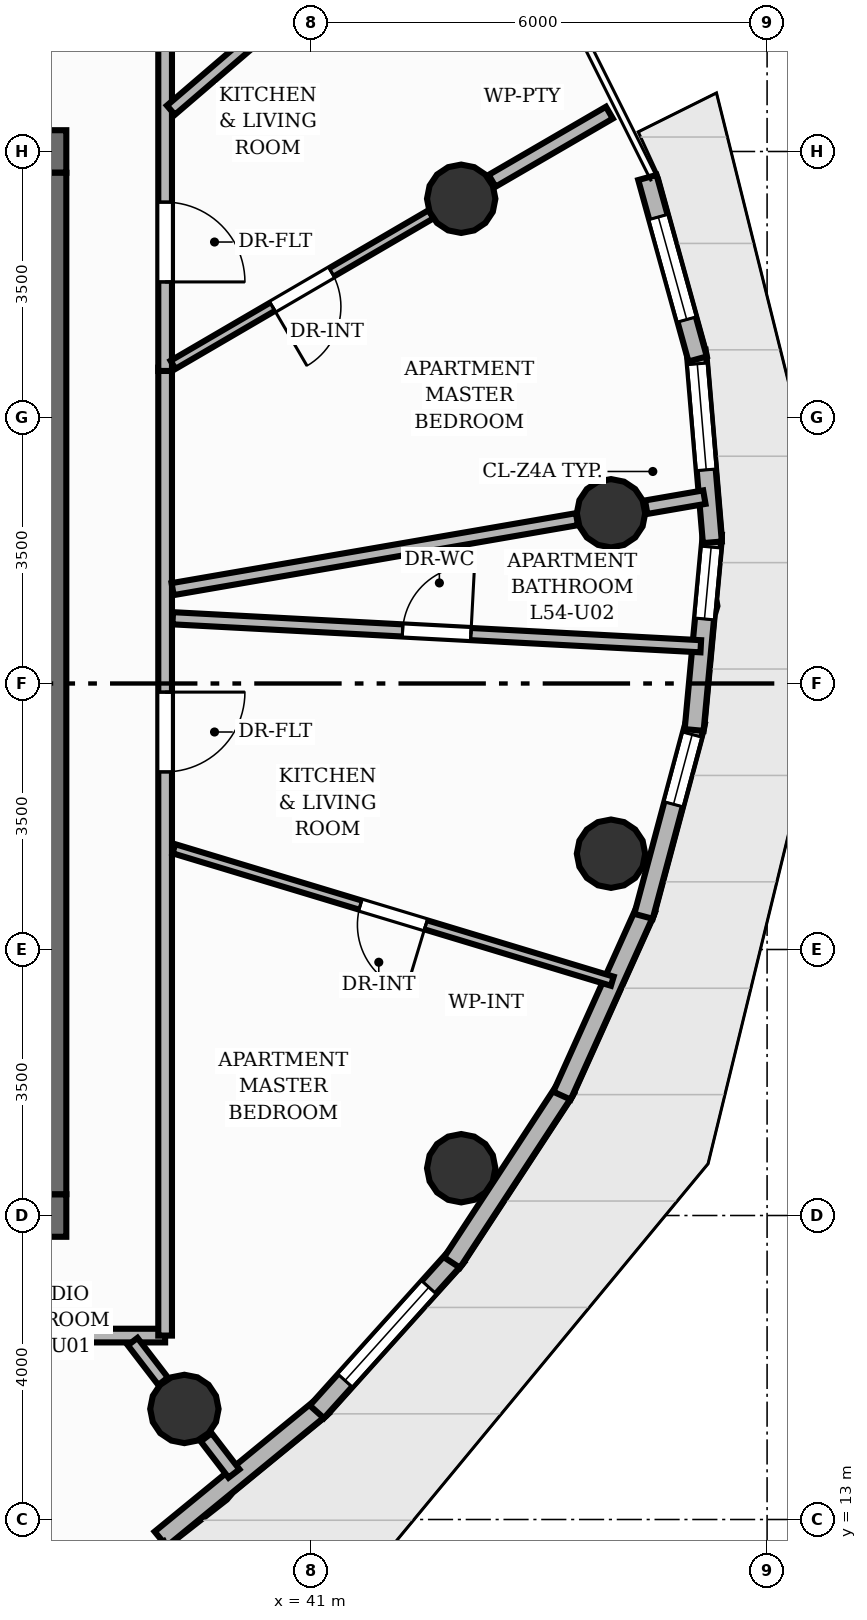
"""IFC4 building model, lengths in metres.
Left out: names, types, materials, properties, quantities, classifications, styles, units other than length and angle.
Written with IfcOpenShell. Run it as: python <this file> out.ifc"""

import sys

from ifc_helpers import new_model, si_unit, direction, frame, frame_2d, origin, origin_2d, place, context, subcontext, project, spatial, rectangle, circle, extrude, element, fill, save


model = new_model("IFC4")
c1 = context("Model", 3, precision=1e-05, world=origin(), true_north=direction((0.0, 1.0)))
c2 = subcontext(c1, "Body", "Model", "MODEL_VIEW")
j1 = project(units=[si_unit("LENGTHUNIT", "METRE"), si_unit("PLANEANGLEUNIT", "RADIAN")], contexts=[c1])
p1 = place(None, origin())
s1 = spatial("IfcSite", under=j1, at=p1, CompositionType="ELEMENT")
p2 = place(p1, origin())
s2 = spatial("IfcBuilding", under=s1, at=p2, CompositionType="ELEMENT")
p3 = place(p2, frame((0.0, 0.0, 182.24)))
s3 = spatial("IfcBuildingStorey", under=s2, at=p3, CompositionType="ELEMENT", Elevation=182.24)
p4 = place(p3, frame((26.22, 17.0, 0.0), z_axis=(0.0, 0.0, 1.0), x_axis=(1.0, 0.0, 0.0)))
e1 = element("IfcWall", 1, at=p4, inside=s3, PredefinedType="SHEAR", context=c2, shape_type="SweptSolid", body=[
    extrude(rectangle(XDim=11.56, YDim=0.56, at=frame_2d((5.78, 0.0))), origin(), (0.0, 0.0, 1.0), 3.2),
])
p5 = place(p4, frame((2.28, 0.0, 0.0)))
e2 = element("IfcOpeningElement", 2, at=p5, cuts=e1, PredefinedType="OPENING", context=c2, shape_type="SweptSolid", body=[
    extrude(rectangle(XDim=1.1, YDim=2.15, at=frame_2d((0.55, 1.075))), frame((0.0, 0.29, 0.0), z_axis=(0.0, -1.0, 0.0), x_axis=(1.0, 0.0, 0.0)), (0.0, 0.0, 1.0), 0.58),
])
p6 = place(p4, frame((5.83, 0.0, 0.0)))
e3 = element("IfcOpeningElement", 3, at=p6, cuts=e1, PredefinedType="OPENING", context=c2, shape_type="SweptSolid", body=[
    extrude(rectangle(XDim=0.9, YDim=2.1, at=frame_2d((0.45, 1.05))), frame((0.0, 0.29, 0.0), z_axis=(0.0, -1.0, 0.0), x_axis=(1.0, 0.0, 0.0)), (0.0, 0.0, 1.0), 0.58),
])
p7 = place(p3, frame((26.22, 31.0, 0.0), z_axis=(0.0, 0.0, 1.0), x_axis=(1.0, 0.0, 0.0)))
e4 = element("IfcWall", 4, at=p7, inside=s3, PredefinedType="SHEAR", context=c2, shape_type="SweptSolid", body=[
    extrude(rectangle(XDim=11.56, YDim=0.56, at=frame_2d((5.78, 0.0))), origin(), (0.0, 0.0, 1.0), 3.2),
])
p8 = place(p7, frame((8.18, 0.0, 0.0)))
e5 = element("IfcOpeningElement", 5, at=p8, cuts=e4, PredefinedType="OPENING", context=c2, shape_type="SweptSolid", body=[
    extrude(rectangle(XDim=1.1, YDim=2.15, at=frame_2d((0.55, 1.075))), frame((0.0, 0.29, 0.0), z_axis=(0.0, -1.0, 0.0), x_axis=(1.0, 0.0, 0.0)), (0.0, 0.0, 1.0), 0.58),
])
p9 = place(p7, frame((0.805, 0.0, 0.0)))
e6 = element("IfcOpeningElement", 6, at=p9, cuts=e4, PredefinedType="OPENING", context=c2, shape_type="SweptSolid", body=[
    extrude(rectangle(XDim=1.05, YDim=2.15, at=frame_2d((0.525, 1.075))), frame((0.0, 0.29, 0.0), z_axis=(0.0, -1.0, 0.0), x_axis=(1.0, 0.0, 0.0)), (0.0, 0.0, 1.0), 0.58),
])
p10 = place(p7, frame((2.555, 0.0, 0.0)))
e7 = element("IfcOpeningElement", 7, at=p10, cuts=e4, PredefinedType="OPENING", context=c2, shape_type="SweptSolid", body=[
    extrude(rectangle(XDim=1.05, YDim=2.15, at=frame_2d((0.525, 1.075))), frame((0.0, 0.29, 0.0), z_axis=(0.0, -1.0, 0.0), x_axis=(1.0, 0.0, 0.0)), (0.0, 0.0, 1.0), 0.58),
])
p11 = place(p7, frame((4.305, 0.0, 0.0)))
e8 = element("IfcOpeningElement", 8, at=p11, cuts=e4, PredefinedType="OPENING", context=c2, shape_type="SweptSolid", body=[
    extrude(rectangle(XDim=1.05, YDim=2.15, at=frame_2d((0.525, 1.075))), frame((0.0, 0.29, 0.0), z_axis=(0.0, -1.0, 0.0), x_axis=(1.0, 0.0, 0.0)), (0.0, 0.0, 1.0), 0.58),
])
p12 = place(p3, frame((37.5, 17.28, 0.0), z_axis=(0.0, 0.0, 1.0), x_axis=(0.0, 1.0, 0.0)))
e9 = element("IfcWall", 9, at=p12, inside=s3, PredefinedType="SHEAR", context=c2, shape_type="SweptSolid", body=[
    extrude(rectangle(XDim=13.44, YDim=0.56, at=frame_2d((6.72, 0.0))), origin(), (0.0, 0.0, 1.0), 3.2),
])
for number, where, z_axis, x_axis in (
    (10, (44.946, 26.24, 0.0), (0.0, 0.0, 1.0), (1.0, 0.0, 0.0)),
    (11, (42.975, 30.378, 0.0), (0.0, 0.0, 1.0), (1.0, 0.0, 0.0)),
    (12, (39.333, 14.455, 0.0), (0.0, 0.0, 1.0), (1.0, 0.0, 0.0)),
    (13, (42.975, 17.622, 0.0), (0.0, 0.0, 1.0), (1.0, 0.0, 0.0)),
    (14, (44.946, 21.76, 0.0), (0.0, 0.0, 1.0), (1.0, 0.0, 0.0)),
):
    element("IfcColumn", number, at=place(p3, frame(where, z_axis=z_axis, x_axis=x_axis)), inside=s3, PredefinedType="COLUMN", context=c2, shape_type="SweptSolid", body=[
        extrude(circle(Radius=0.45, at=origin_2d()), origin(), (0.0, 0.0, 1.0), 3.2),
    ])
p13 = place(p3, frame((41.155, 14.492, 0.0), z_axis=(0.0, 0.0, 1.0), x_axis=(-0.773491700486, -0.633806428872, 0.0)))
e15 = element("IfcWall", 15, at=p13, inside=s3, PredefinedType="SOLIDWALL", context=c2, shape_type="SweptSolid", body=[
    extrude(rectangle(XDim=2.758, YDim=0.25, at=frame_2d((1.379, 0.0))), origin(), (0.0, 0.0, 1.0), 2.96),
])
p14 = place(p3, frame((42.921, 16.468, 0.0), z_axis=(0.0, 0.0, 1.0), x_axis=(-0.668764193685, -0.743474581438, 0.0)))
e16 = element("IfcWall", 16, at=p14, inside=s3, PredefinedType="SOLIDWALL", context=c2, shape_type="SweptSolid", body=[
    extrude(rectangle(XDim=2.758, YDim=0.25, at=frame_2d((1.379, 0.0))), origin(), (0.0, 0.0, 1.0), 2.96),
])
p15 = place(p14, frame((0.554, 0.0, 0.85)))
e17 = element("IfcOpeningElement", 17, at=p15, cuts=e16, PredefinedType="OPENING", context=c2, shape_type="SweptSolid", body=[
    extrude(rectangle(XDim=1.65, YDim=1.55, at=frame_2d((0.825, 0.775))), frame((0.0, 0.135, 0.0), z_axis=(0.0, -1.0, 0.0), x_axis=(1.0, 0.0, 0.0)), (0.0, 0.0, 1.0), 0.27),
])
p16 = place(p3, frame((44.354, 18.673, 0.0), z_axis=(0.0, 0.0, 1.0), x_axis=(-0.547664848596, -0.83669780304, 0.0)))
e18 = element("IfcWall", 18, at=p16, inside=s3, PredefinedType="SOLIDWALL", context=c2, shape_type="SweptSolid", body=[
    extrude(rectangle(XDim=2.739, YDim=0.25, at=frame_2d((1.369, 0.0))), origin(), (0.0, 0.0, 1.0), 2.96),
])
p17 = place(p3, frame((45.411, 21.04, 0.0), z_axis=(0.0, 0.0, 1.0), x_axis=(-0.410736648959, -0.911754026699, 0.0)))
e19 = element("IfcWall", 19, at=p17, inside=s3, PredefinedType="SOLIDWALL", context=c2, shape_type="SweptSolid", body=[
    extrude(rectangle(XDim=2.701, YDim=0.25, at=frame_2d((1.351, 0.0))), origin(), (0.0, 0.0, 1.0), 2.96),
])
p18 = place(p3, frame((46.06, 23.497, 0.0), z_axis=(0.0, 0.0, 1.0), x_axis=(-0.258688517816, -0.965960791518, 0.0)))
e20 = element("IfcWall", 20, at=p18, inside=s3, PredefinedType="SOLIDWALL", context=c2, shape_type="SweptSolid", body=[
    extrude(rectangle(XDim=2.651, YDim=0.25, at=frame_2d((1.326, 0.0))), origin(), (0.0, 0.0, 1.0), 2.96),
])
p19 = place(p18, frame((0.175, 0.0, 0.85)))
e21 = element("IfcOpeningElement", 21, at=p19, cuts=e20, PredefinedType="OPENING", context=c2, shape_type="SweptSolid", body=[
    extrude(rectangle(XDim=0.95, YDim=1.45, at=frame_2d((0.475, 0.725))), frame((0.0, 0.135, 0.0), z_axis=(0.0, -1.0, 0.0), x_axis=(1.0, 0.0, 0.0)), (0.0, 0.0, 1.0), 0.27),
])
p20 = place(p3, frame((46.28, 25.969, 0.0), z_axis=(0.0, 0.0, 1.0), x_axis=(-0.092582110032, -0.995705053167, 0.0)))
e22 = element("IfcWall", 22, at=p20, inside=s3, PredefinedType="SOLIDWALL", context=c2, shape_type="SweptSolid", body=[
    extrude(rectangle(XDim=2.592, YDim=0.25, at=frame_2d((1.296, 0.0))), origin(), (0.0, 0.0, 1.0), 2.96),
])
p21 = place(p20, frame((0.175, 0.0, 0.85)))
e23 = element("IfcOpeningElement", 23, at=p21, cuts=e22, PredefinedType="OPENING", context=c2, shape_type="SweptSolid", body=[
    extrude(rectangle(XDim=0.95, YDim=1.45, at=frame_2d((0.475, 0.725))), frame((0.0, 0.135, 0.0), z_axis=(0.0, -1.0, 0.0), x_axis=(1.0, 0.0, 0.0)), (0.0, 0.0, 1.0), 0.27),
])
p22 = place(p3, frame((46.066, 28.381, 0.0), z_axis=(0.0, 0.0, 1.0), x_axis=(0.084274320236, -0.996442591898, 0.0)))
e24 = element("IfcWall", 24, at=p22, inside=s3, PredefinedType="SOLIDWALL", context=c2, shape_type="SweptSolid", body=[
    extrude(rectangle(XDim=2.532, YDim=0.25, at=frame_2d((1.266, 0.0))), origin(), (0.0, 0.0, 1.0), 2.96),
])
p23 = place(p22, frame((0.175, 0.0, 0.85)))
e25 = element("IfcOpeningElement", 25, at=p23, cuts=e24, PredefinedType="OPENING", context=c2, shape_type="SweptSolid", body=[
    extrude(rectangle(XDim=1.4, YDim=1.55, at=frame_2d((0.7, 0.775))), frame((0.0, 0.135, 0.0), z_axis=(0.0, -1.0, 0.0), x_axis=(1.0, 0.0, 0.0)), (0.0, 0.0, 1.0), 0.27),
])
p24 = place(p3, frame((45.425, 30.658, 0.0), z_axis=(0.0, 0.0, 1.0), x_axis=(0.266734060973, -0.96377017007, 0.0)))
e26 = element("IfcWall", 26, at=p24, inside=s3, PredefinedType="SOLIDWALL", context=c2, shape_type="SweptSolid", body=[
    extrude(rectangle(XDim=2.478, YDim=0.25, at=frame_2d((1.239, 0.0))), origin(), (0.0, 0.0, 1.0), 2.96),
])
p25 = place(p24, frame((0.539, 0.0, 0.85)))
e27 = element("IfcOpeningElement", 27, at=p25, cuts=e26, PredefinedType="OPENING", context=c2, shape_type="SweptSolid", body=[
    extrude(rectangle(XDim=1.4, YDim=1.55, at=frame_2d((0.7, 0.775))), frame((0.0, 0.135, 0.0), z_axis=(0.0, -1.0, 0.0), x_axis=(1.0, 0.0, 0.0)), (0.0, 0.0, 1.0), 0.27),
])
p26 = place(p3, frame((45.409, 26.32, 0.0), z_axis=(0.0, 0.0, 1.0), x_axis=(0.985363715758, 0.170465092225, 0.0)))
e28 = element("IfcWall", 28, at=p26, inside=s3, PredefinedType="PARTITIONING", context=c2, shape_type="SweptSolid", body=[
    extrude(rectangle(XDim=0.776, YDim=0.18, at=frame_2d((0.388, 0.0))), origin(), (0.0, 0.0, 1.0), 2.403),
])
p27 = place(p3, frame((43.382, 30.614, 0.0), z_axis=(0.0, 0.0, 1.0), x_axis=(0.86456661279, 0.502518230563, 0.0)))
e29 = element("IfcWall", 29, at=p27, inside=s3, PredefinedType="PARTITIONING", context=c2, shape_type="SweptSolid", body=[
    extrude(rectangle(XDim=1.785, YDim=0.18, at=frame_2d((0.893, 0.0))), origin(), (0.0, 0.0, 1.0), 2.403),
])
p28 = place(p3, frame((39.62, 14.082, 0.0), z_axis=(0.0, 0.0, 1.0), x_axis=(0.609062571598, -0.793122174623, 0.0)))
e30 = element("IfcWall", 30, at=p28, inside=s3, PredefinedType="PARTITIONING", context=c2, shape_type="SweptSolid", body=[
    extrude(rectangle(XDim=0.601, YDim=0.18, at=frame_2d((0.3, 0.0))), origin(), (0.0, 0.0, 1.0), 2.403),
])
p29 = place(p3, frame((39.08, 15.42, 0.0), z_axis=(0.0, 0.0, 1.0), x_axis=(-1.0, 0.0, 0.0)))
e31 = element("IfcWall", 31, at=p29, inside=s3, PredefinedType="PARTITIONING", context=c2, shape_type="SweptSolid", body=[
    extrude(rectangle(XDim=5.88, YDim=0.18, at=frame_2d((2.94, 0.0))), origin(), (0.0, 0.0, 1.0), 2.955),
])
p30 = place(p29, frame((4.052, 0.0, 0.0)))
e32 = element("IfcOpeningElement", 32, at=p30, cuts=e31, PredefinedType="OPENING", context=c2, shape_type="SweptSolid", body=[
    extrude(rectangle(XDim=1.05, YDim=2.15, at=frame_2d((0.525, 1.075))), frame((0.0, 0.1, 0.0), z_axis=(0.0, -1.0, 0.0), x_axis=(1.0, 0.0, 0.0)), (0.0, 0.0, 1.0), 0.2),
])
p31 = place(p3, frame((39.08, 28.156, 0.0), z_axis=(0.0, 0.0, 1.0), x_axis=(0.0, -1.0, 0.0)))
e33 = element("IfcWall", 33, at=p31, inside=s3, PredefinedType="PARTITIONING", context=c2, shape_type="SweptSolid", body=[
    extrude(rectangle(XDim=12.736, YDim=0.18, at=frame_2d((6.368, 0.0))), origin(), (0.0, 0.0, 1.0), 2.955),
])
p32 = place(p31, frame((4.269, 0.0, 0.0)))
e34 = element("IfcOpeningElement", 34, at=p32, cuts=e33, PredefinedType="OPENING", context=c2, shape_type="SweptSolid", body=[
    extrude(rectangle(XDim=1.05, YDim=2.15, at=frame_2d((0.525, 1.075))), frame((0.0, 0.1, 0.0), z_axis=(0.0, -1.0, 0.0), x_axis=(1.0, 0.0, 0.0)), (0.0, 0.0, 1.0), 0.2),
])
p33 = place(p3, frame((39.08, 32.58, 0.0), z_axis=(0.0, 0.0, 1.0), x_axis=(0.0, -1.0, 0.0)))
e35 = element("IfcWall", 35, at=p33, inside=s3, PredefinedType="PARTITIONING", context=c2, shape_type="SweptSolid", body=[
    extrude(rectangle(XDim=4.468, YDim=0.18, at=frame_2d((2.234, 0.0))), origin(), (0.0, 0.0, 1.0), 2.955),
])
p34 = place(p33, frame((2.246, 0.0, 0.0)))
e36 = element("IfcOpeningElement", 36, at=p34, cuts=e35, PredefinedType="OPENING", context=c2, shape_type="SweptSolid", body=[
    extrude(rectangle(XDim=1.05, YDim=2.15, at=frame_2d((0.525, 1.075))), frame((0.0, 0.1, 0.0), z_axis=(0.0, -1.0, 0.0), x_axis=(1.0, 0.0, 0.0)), (0.0, 0.0, 1.0), 0.2),
])
p35 = place(p3, frame((38.653, 15.341, 0.0), z_axis=(0.0, 0.0, 1.0), x_axis=(0.609101063055, -0.79309261438, 0.0)))
e37 = element("IfcWall", 37, at=p35, inside=s3, PredefinedType="PLUMBINGWALL", context=c2, shape_type="SweptSolid", body=[
    extrude(rectangle(XDim=0.658, YDim=0.16, at=frame_2d((0.329, 0.0))), origin(), (0.0, 0.0, 1.0), 2.403),
])
p36 = place(p3, frame((39.18, 24.858, 0.0), z_axis=(0.0, 0.0, 1.0), x_axis=(0.998597105279, -0.05295112207, 0.0)))
e38 = element("IfcWall", 38, at=p36, inside=s3, PredefinedType="PLUMBINGWALL", context=c2, shape_type="SweptSolid", body=[
    extrude(rectangle(XDim=6.958, YDim=0.16, at=frame_2d((3.479, 0.0))), origin(), (0.0, 0.0, 1.0), 2.692),
])
p37 = place(p36, frame((3.029, 0.0, 0.0)))
e39 = element("IfcOpeningElement", 39, at=p37, cuts=e38, PredefinedType="OPENING", context=c2, shape_type="SweptSolid", body=[
    extrude(rectangle(XDim=0.9, YDim=2.1, at=frame_2d((0.45, 1.05))), frame((0.0, 0.09, 0.0), z_axis=(0.0, -1.0, 0.0), x_axis=(1.0, 0.0, 0.0)), (0.0, 0.0, 1.0), 0.18),
])
p38 = place(p3, frame((44.963, 20.083, 0.0), z_axis=(0.0, 0.0, 1.0), x_axis=(-0.95726021897, 0.289228064298, 0.0)))
e40 = element("IfcWall", 40, at=p38, inside=s3, PredefinedType="PARTITIONING", context=c2, shape_type="SweptSolid", body=[
    extrude(rectangle(XDim=6.026, YDim=0.125, at=frame_2d((3.013, 0.0))), origin(), (0.0, 0.0, 1.0), 2.692),
])
p39 = place(p38, frame((2.563, 0.0, 0.0)))
e41 = element("IfcOpeningElement", 41, at=p39, cuts=e40, PredefinedType="OPENING", context=c2, shape_type="SweptSolid", body=[
    extrude(rectangle(XDim=0.9, YDim=2.1, at=frame_2d((0.45, 1.05))), frame((0.0, 0.073, 0.0), z_axis=(0.0, -1.0, 0.0), x_axis=(1.0, 0.0, 0.0)), (0.0, 0.0, 1.0), 0.145),
])
p40 = place(p3, frame((39.178, 25.242, 0.0), z_axis=(0.0, 0.0, 1.0), x_axis=(0.985362047777, 0.170474733611, 0.0)))
e42 = element("IfcWall", 42, at=p40, inside=s3, PredefinedType="PLUMBINGWALL", context=c2, shape_type="SweptSolid", body=[
    extrude(rectangle(XDim=5.399, YDim=0.16, at=frame_2d((2.7, 0.0))), origin(), (0.0, 0.0, 1.0), 2.403),
])
p41 = place(p3, frame((39.156, 31.544, 0.0), z_axis=(0.0, 0.0, 1.0), x_axis=(0.759083333315, 0.650993466238, 0.0)))
e43 = element("IfcWall", 43, at=p41, inside=s3, PredefinedType="PLUMBINGWALL", context=c2, shape_type="SweptSolid", body=[
    extrude(rectangle(XDim=4.775, YDim=0.16, at=frame_2d((2.387, 0.0))), origin(), (0.0, 0.0, 1.0), 2.955),
])
p42 = place(p41, frame((2.217, 0.0, 0.0)))
e44 = element("IfcOpeningElement", 44, at=p42, cuts=e43, PredefinedType="OPENING", context=c2, shape_type="SweptSolid", body=[
    extrude(rectangle(XDim=0.9, YDim=2.1, at=frame_2d((0.45, 1.05))), frame((0.0, 0.09, 0.0), z_axis=(0.0, -1.0, 0.0), x_axis=(1.0, 0.0, 0.0)), (0.0, 0.0, 1.0), 0.18),
])
p43 = place(p3, frame((42.58, 30.175, 0.0), z_axis=(0.0, 0.0, 1.0), x_axis=(-0.863675291667, -0.504048599407, 0.0)))
e45 = element("IfcWall", 45, at=p43, inside=s3, PredefinedType="PARTITIONING", context=c2, shape_type="SweptSolid", body=[
    extrude(rectangle(XDim=3.932, YDim=0.125, at=frame_2d((1.966, 0.0))), origin(), (0.0, 0.0, 1.0), 2.403),
])
p44 = place(p43, frame((1.516, 0.0, 0.0)))
e46 = element("IfcOpeningElement", 46, at=p44, cuts=e45, PredefinedType="OPENING", context=c2, shape_type="SweptSolid", body=[
    extrude(rectangle(XDim=0.9, YDim=2.1, at=frame_2d((0.45, 1.05))), frame((0.0, 0.073, 0.0), z_axis=(0.0, -1.0, 0.0), x_axis=(1.0, 0.0, 0.0)), (0.0, 0.0, 1.0), 0.145),
])
p45 = place(p15, origin())
e47 = element("IfcWindow", 47, at=p45, inside=s3, PartitioningType="SINGLE_PANEL", PredefinedType="WINDOW", context=c2, shape_type="SweptSolid", body=[
    extrude(rectangle(XDim=1.65, YDim=1.55, at=frame_2d((0.825, 0.775))), frame((0.0, 0.03, 0.0), z_axis=(0.0, -1.0, 0.0), x_axis=(1.0, 0.0, 0.0)), (0.0, 0.0, 1.0), 0.06),
])
fill(e17, e47)
p46 = place(p19, origin())
e48 = element("IfcWindow", 48, at=p46, inside=s3, PartitioningType="SINGLE_PANEL", PredefinedType="WINDOW", context=c2, shape_type="SweptSolid", body=[
    extrude(rectangle(XDim=0.95, YDim=1.45, at=frame_2d((0.475, 0.725))), frame((0.0, 0.03, 0.0), z_axis=(0.0, -1.0, 0.0), x_axis=(1.0, 0.0, 0.0)), (0.0, 0.0, 1.0), 0.06),
])
fill(e21, e48)
p47 = place(p21, origin())
e49 = element("IfcWindow", 49, at=p47, inside=s3, PartitioningType="SINGLE_PANEL", PredefinedType="WINDOW", context=c2, shape_type="SweptSolid", body=[
    extrude(rectangle(XDim=0.95, YDim=1.45, at=frame_2d((0.475, 0.725))), frame((0.0, 0.03, 0.0), z_axis=(0.0, -1.0, 0.0), x_axis=(1.0, 0.0, 0.0)), (0.0, 0.0, 1.0), 0.06),
])
fill(e23, e49)
p48 = place(p23, origin())
e50 = element("IfcWindow", 50, at=p48, inside=s3, PartitioningType="SINGLE_PANEL", PredefinedType="WINDOW", context=c2, shape_type="SweptSolid", body=[
    extrude(rectangle(XDim=1.4, YDim=1.55, at=frame_2d((0.7, 0.775))), frame((0.0, 0.03, 0.0), z_axis=(0.0, -1.0, 0.0), x_axis=(1.0, 0.0, 0.0)), (0.0, 0.0, 1.0), 0.06),
])
fill(e25, e50)
p49 = place(p25, origin())
e51 = element("IfcWindow", 51, at=p49, inside=s3, PartitioningType="SINGLE_PANEL", PredefinedType="WINDOW", context=c2, shape_type="SweptSolid", body=[
    extrude(rectangle(XDim=1.4, YDim=1.55, at=frame_2d((0.7, 0.775))), frame((0.0, 0.03, 0.0), z_axis=(0.0, -1.0, 0.0), x_axis=(1.0, 0.0, 0.0)), (0.0, 0.0, 1.0), 0.06),
])
fill(e27, e51)
p50 = place(p32, origin())
e52 = element("IfcDoor", 52, at=p50, inside=s3, OperationType="SINGLE_SWING_LEFT", PredefinedType="DOOR", context=c2, shape_type="SweptSolid", body=[
    extrude(rectangle(XDim=1.05, YDim=2.15, at=frame_2d((0.525, 1.075))), frame((0.0, 0.025, 0.0), z_axis=(0.0, -1.0, 0.0), x_axis=(1.0, 0.0, 0.0)), (0.0, 0.0, 1.0), 0.05),
])
fill(e34, e52)
p51 = place(p37, origin())
e53 = element("IfcDoor", 53, at=p51, inside=s3, OperationType="SINGLE_SWING_RIGHT", PredefinedType="DOOR", context=c2, shape_type="SweptSolid", body=[
    extrude(rectangle(XDim=0.9, YDim=2.1, at=frame_2d((0.45, 1.05))), frame((0.0, 0.025, 0.0), z_axis=(0.0, -1.0, 0.0), x_axis=(1.0, 0.0, 0.0)), (0.0, 0.0, 1.0), 0.05),
])
fill(e39, e53)
p52 = place(p39, origin())
e54 = element("IfcDoor", 54, at=p52, inside=s3, OperationType="SINGLE_SWING_LEFT", PredefinedType="DOOR", context=c2, shape_type="SweptSolid", body=[
    extrude(rectangle(XDim=0.9, YDim=2.1, at=frame_2d((0.45, 1.05))), frame((0.0, 0.025, 0.0), z_axis=(0.0, -1.0, 0.0), x_axis=(1.0, 0.0, 0.0)), (0.0, 0.0, 1.0), 0.05),
])
fill(e41, e54)
p53 = place(p34, origin())
e55 = element("IfcDoor", 55, at=p53, inside=s3, OperationType="SINGLE_SWING_RIGHT", PredefinedType="DOOR", context=c2, shape_type="SweptSolid", body=[
    extrude(rectangle(XDim=1.05, YDim=2.15, at=frame_2d((0.525, 1.075))), frame((0.0, 0.025, 0.0), z_axis=(0.0, -1.0, 0.0), x_axis=(1.0, 0.0, 0.0)), (0.0, 0.0, 1.0), 0.05),
])
fill(e36, e55)
p54 = place(p44, origin())
e56 = element("IfcDoor", 56, at=p54, inside=s3, OperationType="SINGLE_SWING_RIGHT", PredefinedType="DOOR", context=c2, shape_type="SweptSolid", body=[
    extrude(rectangle(XDim=0.9, YDim=2.1, at=frame_2d((0.45, 1.05))), frame((0.0, 0.025, 0.0), z_axis=(0.0, -1.0, 0.0), x_axis=(1.0, 0.0, 0.0)), (0.0, 0.0, 1.0), 0.05),
])
fill(e46, e56)
save(model, sys.argv[1])
